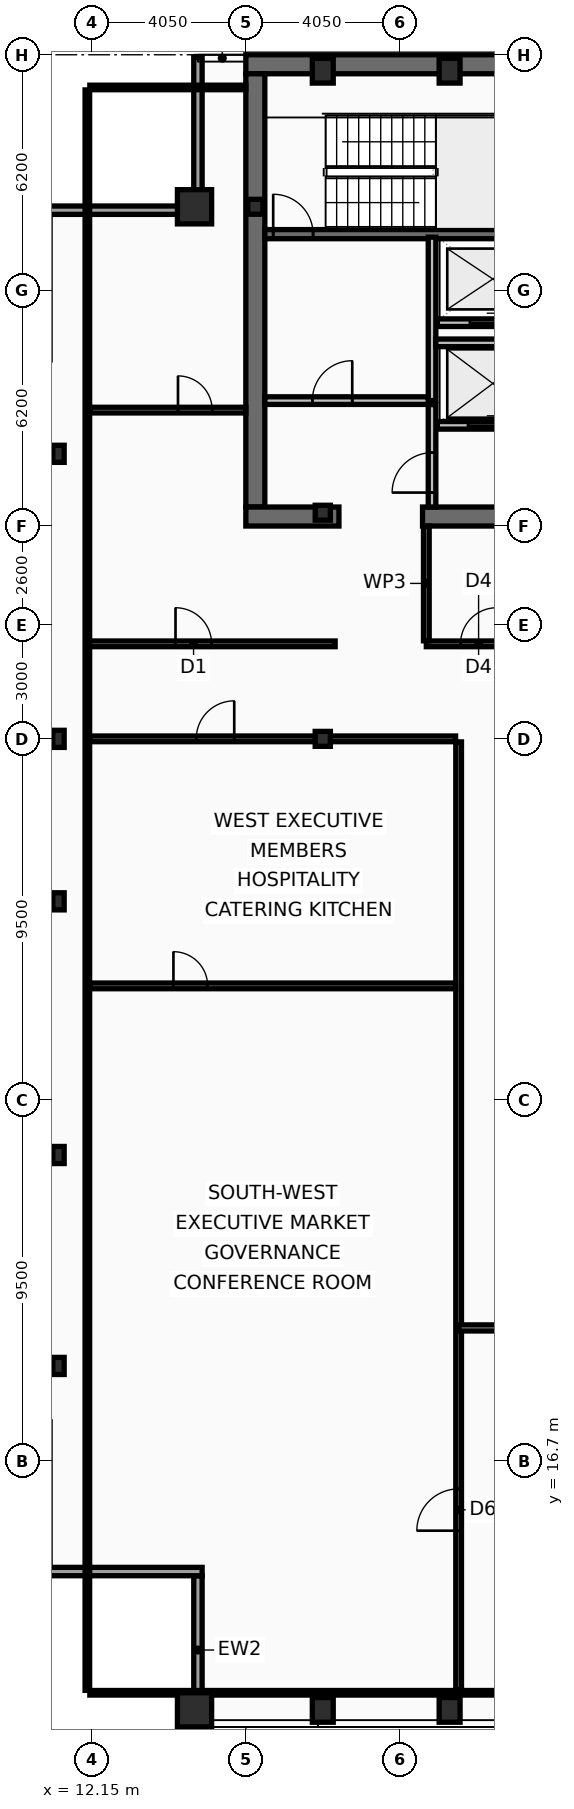
"""IFC4 building model, lengths in metres.
Left out: names, types, materials, properties, quantities, classifications, styles, units other than length and angle.
Written with IfcOpenShell. Run it as: python <this file> out.ifc"""

import sys

from ifc_helpers import new_model, si_unit, direction, frame, frame_2d, origin, origin_2d, place, context, subcontext, project, spatial, rectangle, hollow_rectangle, i_section, extrude, element, fill, save


model = new_model("IFC4")
c1 = context("Model", 3, precision=1e-05, world=origin(), true_north=direction((0.0, 1.0)))
c2 = subcontext(c1, "Body", "Model", "MODEL_VIEW")
j1 = project(units=[si_unit("LENGTHUNIT", "METRE"), si_unit("PLANEANGLEUNIT", "RADIAN")], contexts=[c1])
p1 = place(None, origin())
s1 = spatial("IfcSite", under=j1, at=p1, CompositionType="ELEMENT")
p2 = place(p1, origin())
s2 = spatial("IfcBuilding", under=s1, at=p2, CompositionType="ELEMENT")
p3 = place(p2, frame((0.0, 0.0, 329.0)))
s3 = spatial("IfcBuildingStorey", under=s2, at=p3, CompositionType="ELEMENT", Elevation=329.0)
p4 = place(p3, frame((16.2, 53.45, 0.0), z_axis=(0.0, 0.0, 1.0), x_axis=(1.0, 0.0, 0.0)))
e1 = element("IfcWall", 1, at=p4, inside=s3, PredefinedType="SHEAR", context=c2, shape_type="SweptSolid", body=[
    extrude(rectangle(XDim=40.5, YDim=0.5, at=frame_2d((20.25, 0.0))), origin(), (0.0, 0.0, 1.0), 3.44),
])
p5 = place(p3, frame((16.45, 41.8, 0.0), z_axis=(0.0, 0.0, 1.0), x_axis=(0.0, 1.0, 0.0)))
e2 = element("IfcWall", 2, at=p5, inside=s3, PredefinedType="SHEAR", context=c2, shape_type="SweptSolid", body=[
    extrude(rectangle(XDim=11.4, YDim=0.5, at=frame_2d((5.7, 0.0))), origin(), (0.0, 0.0, 1.0), 3.44),
])
p6 = place(p3, frame((18.65, 41.55, 0.0), z_axis=(0.0, 0.0, 1.0), x_axis=(-1.0, 0.0, 0.0)))
e3 = element("IfcWall", 3, at=p6, inside=s3, PredefinedType="SHEAR", context=c2, shape_type="SweptSolid", body=[
    extrude(rectangle(XDim=2.45, YDim=0.5, at=frame_2d((1.225, 0.0))), origin(), (0.0, 0.0, 1.0), 3.44),
])
p7 = place(p3, frame((32.3, 41.55, 0.0), z_axis=(0.0, 0.0, 1.0), x_axis=(-1.0, 0.0, 0.0)))
e4 = element("IfcWall", 4, at=p7, inside=s3, PredefinedType="SHEAR", context=c2, shape_type="SweptSolid", body=[
    extrude(rectangle(XDim=11.45, YDim=0.5, at=frame_2d((5.725, 0.0))), origin(), (0.0, 0.0, 1.0), 3.44),
])
p8 = place(p3, frame((16.7, 48.98, 0.0), z_axis=(0.0, 0.0, 1.0), x_axis=(1.0, 0.0, 0.0)))
e5 = element("IfcWall", 5, at=p8, inside=s3, PredefinedType="SHEAR", context=c2, shape_type="SweptSolid", body=[
    extrude(rectangle(XDim=7.52, YDim=0.24, at=frame_2d((3.76, 0.0))), origin(), (0.0, 0.0, 1.0), 3.44),
])
p9 = place(p8, frame((0.22, 0.0, 0.0)))
e6 = element("IfcOpeningElement", 6, at=p9, cuts=e5, PredefinedType="OPENING", context=c2, shape_type="SweptSolid", body=[
    extrude(rectangle(XDim=1.05, YDim=2.15, at=frame_2d((0.525, 1.075))), frame((0.0, 0.13, 0.0), z_axis=(0.0, -1.0, 0.0), x_axis=(1.0, 0.0, 0.0)), (0.0, 0.0, 1.0), 0.26),
])
for number, where, z_axis, x_axis in (
    (7, (14.85, 10.15, 0.0), (0.0, 0.0, 1.0), (1.0, 0.0, 0.0)),
    (8, (14.85, 49.7, 0.0), (0.0, 0.0, 1.0), (1.0, 0.0, 0.0)),
):
    element("IfcColumn", number, at=place(p3, frame(where, z_axis=z_axis, x_axis=x_axis)), inside=s3, PredefinedType="COLUMN", context=c2, shape_type="SweptSolid", body=[
        extrude(hollow_rectangle(XDim=0.9, YDim=0.9, WallThickness=0.05, at=origin_2d()), origin(), (0.0, 0.0, 1.0), 3.6),
    ])
for number, where, z_axis, x_axis in (
    (9, (18.225, 10.15, 0.0), (0.0, 0.0, 1.0), (1.0, 0.0, 0.0)),
    (10, (21.562, 10.15, 0.0), (0.0, 0.0, 1.0), (1.0, 0.0, 0.0)),
    (11, (18.225, 53.28, 0.0), (0.0, 0.0, 1.0), (1.0, 0.0, 0.0)),
    (12, (21.562, 53.28, 0.0), (0.0, 0.0, 1.0), (1.0, 0.0, 0.0)),
):
    element("IfcColumn", number, at=place(p3, frame(where, z_axis=z_axis, x_axis=x_axis)), inside=s3, PredefinedType="COLUMN", context=c2, shape_type="SweptSolid", body=[
        extrude(hollow_rectangle(XDim=0.55, YDim=0.65, WallThickness=0.04, at=origin_2d()), origin(), (0.0, 0.0, 1.0), 3.6),
    ])
for number, where, z_axis, x_axis in (
    (13, (11.27, 19.2, 0.0), (0.0, 0.0, 1.0), (1.0, 0.0, 0.0)),
    (14, (11.27, 24.75, 0.0), (0.0, 0.0, 1.0), (1.0, 0.0, 0.0)),
    (15, (11.27, 31.425, 0.0), (0.0, 0.0, 1.0), (1.0, 0.0, 0.0)),
    (16, (11.27, 35.7, 0.0), (0.0, 0.0, 1.0), (1.0, 0.0, 0.0)),
    (17, (11.27, 43.2, 0.0), (0.0, 0.0, 1.0), (1.0, 0.0, 0.0)),
):
    element("IfcColumn", number, at=place(p3, frame(where, z_axis=z_axis, x_axis=x_axis)), inside=s3, PredefinedType="COLUMN", context=c2, shape_type="SweptSolid", body=[
        extrude(i_section(OverallWidth=0.3, OverallDepth=0.45, WebThickness=0.014, FlangeThickness=0.026, at=origin_2d()), origin(), (0.0, 0.0, 1.0), 3.6),
    ])
for number, where, z_axis, x_axis in (
    (18, (16.45, 49.7, 0.0), (0.0, 0.0, 1.0), (1.0, 0.0, 0.0)),
    (19, (18.225, 35.7, 0.0), (0.0, 0.0, 1.0), (1.0, 0.0, 0.0)),
    (20, (18.225, 41.65, 0.0), (0.0, 0.0, 1.0), (1.0, 0.0, 0.0)),
):
    element("IfcColumn", number, at=place(p3, frame(where, z_axis=z_axis, x_axis=x_axis)), inside=s3, PredefinedType="COLUMN", context=c2, shape_type="SweptSolid", body=[
        extrude(i_section(OverallWidth=0.399, OverallDepth=0.393, WebThickness=0.023, FlangeThickness=0.037, at=origin_2d()), origin(), (0.0, 0.0, 1.0), 3.6),
    ])
p10 = place(p3, frame((14.94, 9.77, 0.0), z_axis=(0.0, 0.0, 1.0), x_axis=(0.0, 1.0, 0.0)))
e21 = element("IfcWall", 21, at=p10, inside=s3, PredefinedType="SOLIDWALL", context=c2, shape_type="SweptSolid", body=[
    extrude(rectangle(XDim=3.91, YDim=0.22, at=frame_2d((1.955, 0.0))), origin(), (0.0, 0.0, 1.0), 2.88),
])
for number, where, z_axis, x_axis in (
    (22, (15.05, 13.79, 0.0), (0.0, 0.0, 1.0), (-1.0, 0.0, 0.0)),
    (23, (10.83, 49.61, 0.0), (0.0, 0.0, 1.0), (1.0, 0.0, 0.0)),
):
    element("IfcWall", number, at=place(p3, frame(where, z_axis=z_axis, x_axis=x_axis)), inside=s3, PredefinedType="SOLIDWALL", context=c2, shape_type="SweptSolid", body=[
        extrude(rectangle(XDim=4.22, YDim=0.22, at=frame_2d((2.11, 0.0))), origin(), (0.0, 0.0, 1.0), 2.88),
    ])
p11 = place(p3, frame((14.94, 49.72, 0.0), z_axis=(0.0, 0.0, 1.0), x_axis=(0.0, 1.0, 0.0)))
e24 = element("IfcWall", 24, at=p11, inside=s3, PredefinedType="SOLIDWALL", context=c2, shape_type="SweptSolid", body=[
    extrude(rectangle(XDim=3.91, YDim=0.22, at=frame_2d((1.955, 0.0))), origin(), (0.0, 0.0, 1.0), 2.88),
])
p12 = place(p3, frame((24.21, 43.95, 0.0), z_axis=(0.0, 0.0, 1.0), x_axis=(-1.0, 0.0, 0.0)))
e25 = element("IfcWall", 25, at=p12, inside=s3, PredefinedType="PARTITIONING", context=c2, shape_type="SweptSolid", body=[
    extrude(rectangle(XDim=2.97, YDim=0.2, at=frame_2d((1.485, 0.0))), origin(), (0.0, 0.0, 1.0), 3.44),
])
p13 = place(p12, frame((0.86, 0.0, 0.0)))
e26 = element("IfcOpeningElement", 26, at=p13, cuts=e25, PredefinedType="OPENING", context=c2, shape_type="SweptSolid", body=[
    extrude(rectangle(XDim=1.3, YDim=2.18, at=frame_2d((0.65, 1.09))), frame((0.0, 0.11, 0.0), z_axis=(0.0, -1.0, 0.0), x_axis=(1.0, 0.0, 0.0)), (0.0, 0.0, 1.0), 0.22),
])
p14 = place(p3, frame((24.21, 46.65, 0.0), z_axis=(0.0, 0.0, 1.0), x_axis=(-1.0, 0.0, 0.0)))
e27 = element("IfcWall", 27, at=p14, inside=s3, PredefinedType="PARTITIONING", context=c2, shape_type="SweptSolid", body=[
    extrude(rectangle(XDim=2.97, YDim=0.2, at=frame_2d((1.485, 0.0))), origin(), (0.0, 0.0, 1.0), 3.44),
])
p15 = place(p14, frame((0.91, 0.0, 0.0)))
e28 = element("IfcOpeningElement", 28, at=p15, cuts=e27, PredefinedType="OPENING", context=c2, shape_type="SweptSolid", body=[
    extrude(rectangle(XDim=1.2, YDim=2.18, at=frame_2d((0.6, 1.09))), frame((0.0, 0.11, 0.0), z_axis=(0.0, -1.0, 0.0), x_axis=(1.0, 0.0, 0.0)), (0.0, 0.0, 1.0), 0.22),
])
p16 = place(p3, frame((21.1, 44.6, 0.0), z_axis=(0.0, 0.0, 1.0), x_axis=(0.0, 1.0, 0.0)))
e29 = element("IfcWall", 29, at=p16, inside=s3, PredefinedType="PARTITIONING", context=c2, shape_type="SweptSolid", body=[
    extrude(rectangle(XDim=4.3, YDim=0.2, at=frame_2d((2.15, 0.0))), origin(), (0.0, 0.0, 1.0), 3.44),
])
p17 = place(p3, frame((16.7, 44.6, 0.0), z_axis=(0.0, 0.0, 1.0), x_axis=(1.0, 0.0, 0.0)))
e30 = element("IfcWall", 30, at=p17, inside=s3, PredefinedType="PARTITIONING", context=c2, shape_type="SweptSolid", body=[
    extrude(rectangle(XDim=4.3, YDim=0.2, at=frame_2d((2.15, 0.0))), origin(), (0.0, 0.0, 1.0), 3.44),
])
p18 = place(p17, frame((1.25, 0.0, 0.0)))
e31 = element("IfcOpeningElement", 31, at=p18, cuts=e30, PredefinedType="OPENING", context=c2, shape_type="SweptSolid", body=[
    extrude(rectangle(XDim=1.05, YDim=2.15, at=frame_2d((0.525, 1.075))), frame((0.0, 0.11, 0.0), z_axis=(0.0, -1.0, 0.0), x_axis=(1.0, 0.0, 0.0)), (0.0, 0.0, 1.0), 0.22),
])
p19 = place(p3, frame((21.2, 46.12, 0.0), z_axis=(0.0, 0.0, 1.0), x_axis=(1.0, 0.0, 0.0)))
e32 = element("IfcWall", 32, at=p19, inside=s3, PredefinedType="PARTITIONING", context=c2, shape_type="SweptSolid", body=[
    extrude(rectangle(XDim=3.02, YDim=0.2, at=frame_2d((1.51, 0.0))), origin(), (0.0, 0.0, 1.0), 3.44),
])
p20 = place(p3, frame((21.1, 41.8, 0.0), z_axis=(0.0, 0.0, 1.0), x_axis=(0.0, 1.0, 0.0)))
e33 = element("IfcWall", 33, at=p20, inside=s3, PredefinedType="PARTITIONING", context=c2, shape_type="SweptSolid", body=[
    extrude(rectangle(XDim=2.695, YDim=0.2, at=frame_2d((1.348, 0.0))), origin(), (0.0, 0.0, 1.0), 3.44),
])
p21 = place(p20, frame((0.38, 0.0, 0.0)))
e34 = element("IfcOpeningElement", 34, at=p21, cuts=e33, PredefinedType="OPENING", context=c2, shape_type="SweptSolid", body=[
    extrude(rectangle(XDim=1.05, YDim=2.15, at=frame_2d((0.525, 1.075))), frame((0.0, 0.11, 0.0), z_axis=(0.0, -1.0, 0.0), x_axis=(1.0, 0.0, 0.0)), (0.0, 0.0, 1.0), 0.22),
])
p22 = place(p3, frame((20.95, 38.2, 0.0), z_axis=(0.0, 0.0, 1.0), x_axis=(1.0, 0.0, 0.0)))
e35 = element("IfcWall", 35, at=p22, inside=s3, PredefinedType="PARTITIONING", context=c2, shape_type="SweptSolid", body=[
    extrude(rectangle(XDim=4.55, YDim=0.15, at=frame_2d((2.275, 0.0))), origin(), (0.0, 0.0, 1.0), 2.83),
])
p23 = place(p22, frame((0.9, 0.0, 0.0)))
e36 = element("IfcOpeningElement", 36, at=p23, cuts=e35, PredefinedType="OPENING", context=c2, shape_type="SweptSolid", body=[
    extrude(rectangle(XDim=0.95, YDim=2.05, at=frame_2d((0.475, 1.025))), frame((0.0, 0.085, 0.0), z_axis=(0.0, -1.0, 0.0), x_axis=(1.0, 0.0, 0.0)), (0.0, 0.0, 1.0), 0.17),
])
p24 = place(p3, frame((20.95, 38.28, 0.0), z_axis=(0.0, 0.0, 1.0), x_axis=(0.0, 1.0, 0.0)))
e37 = element("IfcWall", 37, at=p24, inside=s3, PredefinedType="PARTITIONING", context=c2, shape_type="SweptSolid", body=[
    extrude(rectangle(XDim=3.02, YDim=0.15, at=frame_2d((1.51, 0.0))), origin(), (0.0, 0.0, 1.0), 3.44),
])
p25 = place(p3, frame((12.03, 38.2, 0.0), z_axis=(0.0, 0.0, 1.0), x_axis=(1.0, 0.0, 0.0)))
e38 = element("IfcWall", 38, at=p25, inside=s3, PredefinedType="PARTITIONING", context=c2, shape_type="SweptSolid", body=[
    extrude(rectangle(XDim=6.52, YDim=0.15, at=frame_2d((3.26, 0.0))), origin(), (0.0, 0.0, 1.0), 2.83),
])
p26 = place(p25, frame((2.32, 0.0, 0.0)))
e39 = element("IfcOpeningElement", 39, at=p26, cuts=e38, PredefinedType="OPENING", context=c2, shape_type="SweptSolid", body=[
    extrude(rectangle(XDim=0.95, YDim=2.05, at=frame_2d((0.475, 1.025))), frame((0.0, 0.085, 0.0), z_axis=(0.0, -1.0, 0.0), x_axis=(1.0, 0.0, 0.0)), (0.0, 0.0, 1.0), 0.17),
])
p27 = place(p3, frame((12.095, 44.35, 0.0), z_axis=(0.0, 0.0, 1.0), x_axis=(1.0, 0.0, 0.0)))
e40 = element("IfcWall", 40, at=p27, inside=s3, PredefinedType="PARTITIONING", context=c2, shape_type="SweptSolid", body=[
    extrude(rectangle(XDim=4.105, YDim=0.15, at=frame_2d((2.052, 0.0))), origin(), (0.0, 0.0, 1.0), 2.88),
])
p28 = place(p27, frame((2.32, 0.0, 0.0)))
e41 = element("IfcOpeningElement", 41, at=p28, cuts=e40, PredefinedType="OPENING", context=c2, shape_type="SweptSolid", body=[
    extrude(rectangle(XDim=0.9, YDim=2.05, at=frame_2d((0.45, 1.025))), frame((0.0, 0.085, 0.0), z_axis=(0.0, -1.0, 0.0), x_axis=(1.0, 0.0, 0.0)), (0.0, 0.0, 1.0), 0.17),
])
p29 = place(p3, frame((21.8, 10.665, 0.0), z_axis=(0.0, 0.0, 1.0), x_axis=(0.0, 1.0, 0.0)))
e42 = element("IfcWall", 42, at=p29, inside=s3, PredefinedType="PARTITIONING", context=c2, shape_type="SweptSolid", body=[
    extrude(rectangle(XDim=24.955, YDim=0.15, at=frame_2d((12.478, 0.0))), origin(), (0.0, 0.0, 1.0), 3.07),
])
p30 = place(p29, frame((4.2, 0.0, 0.0)))
e43 = element("IfcOpeningElement", 43, at=p30, cuts=e42, PredefinedType="OPENING", context=c2, shape_type="SweptSolid", body=[
    extrude(rectangle(XDim=1.1, YDim=2.1, at=frame_2d((0.55, 1.05))), frame((0.0, 0.085, 0.0), z_axis=(0.0, -1.0, 0.0), x_axis=(1.0, 0.0, 0.0)), (0.0, 0.0, 1.0), 0.17),
])
p31 = place(p3, frame((12.095, 35.7, 0.0), z_axis=(0.0, 0.0, 1.0), x_axis=(1.0, 0.0, 0.0)))
e44 = element("IfcWall", 44, at=p31, inside=s3, PredefinedType="PARTITIONING", context=c2, shape_type="SweptSolid", body=[
    extrude(rectangle(XDim=9.625, YDim=0.15, at=frame_2d((4.812, 0.0))), origin(), (0.0, 0.0, 1.0), 2.83),
])
p32 = place(p31, frame((2.8, 0.0, 0.0)))
e45 = element("IfcOpeningElement", 45, at=p32, cuts=e44, PredefinedType="OPENING", context=c2, shape_type="SweptSolid", body=[
    extrude(rectangle(XDim=1.0, YDim=2.05, at=frame_2d((0.5, 1.025))), frame((0.0, 0.085, 0.0), z_axis=(0.0, -1.0, 0.0), x_axis=(1.0, 0.0, 0.0)), (0.0, 0.0, 1.0), 0.17),
])
p33 = place(p3, frame((12.095, 29.2, 0.0), z_axis=(0.0, 0.0, 1.0), x_axis=(1.0, 0.0, 0.0)))
e46 = element("IfcWall", 46, at=p33, inside=s3, PredefinedType="PARTITIONING", context=c2, shape_type="SweptSolid", body=[
    extrude(rectangle(XDim=9.625, YDim=0.15, at=frame_2d((4.812, 0.0))), origin(), (0.0, 0.0, 1.0), 2.83),
])
p34 = place(p33, frame((2.2, 0.0, 0.0)))
e47 = element("IfcOpeningElement", 47, at=p34, cuts=e46, PredefinedType="OPENING", context=c2, shape_type="SweptSolid", body=[
    extrude(rectangle(XDim=0.9, YDim=2.05, at=frame_2d((0.45, 1.025))), frame((0.0, 0.085, 0.0), z_axis=(0.0, -1.0, 0.0), x_axis=(1.0, 0.0, 0.0)), (0.0, 0.0, 1.0), 0.17),
])
p35 = place(p3, frame((21.8, 20.2, 0.0), z_axis=(0.0, 0.0, 1.0), x_axis=(1.0, 0.0, 0.0)))
e48 = element("IfcWall", 48, at=p35, inside=s3, PredefinedType="PARTITIONING", context=c2, shape_type="SweptSolid", body=[
    extrude(rectangle(XDim=8.599, YDim=0.16, at=frame_2d((4.299, 0.0))), origin(), (0.0, 0.0, 1.0), 2.83),
])
p36 = place(p35, frame((3.611, 0.0, 0.0)))
e49 = element("IfcOpeningElement", 49, at=p36, cuts=e48, PredefinedType="OPENING", context=c2, shape_type="SweptSolid", body=[
    extrude(rectangle(XDim=1.0, YDim=2.05, at=frame_2d((0.5, 1.025))), frame((0.0, 0.09, 0.0), z_axis=(0.0, -1.0, 0.0), x_axis=(1.0, 0.0, 0.0)), (0.0, 0.0, 1.0), 0.18),
])
p37 = place(p3, frame((12.03, 10.665, 0.0), z_axis=(0.0, 0.0, 1.0), x_axis=(0.0, 1.0, 0.0)))
e50 = element("IfcWall", 50, at=p37, inside=s3, PredefinedType="PARTITIONING", context=c2, shape_type="SweptSolid", body=[
    extrude(rectangle(XDim=42.11, YDim=0.12, at=frame_2d((21.055, 0.0))), origin(), (0.0, 0.0, 1.0), 2.83),
])
p38 = place(p3, frame((12.095, 52.84, 0.0), z_axis=(0.0, 0.0, 1.0), x_axis=(1.0, 0.0, 0.0)))
e51 = element("IfcWall", 51, at=p38, inside=s3, PredefinedType="PARTITIONING", context=c2, shape_type="SweptSolid", body=[
    extrude(rectangle(XDim=4.105, YDim=0.12, at=frame_2d((2.052, 0.0))), origin(), (0.0, 0.0, 1.0), 3.44),
])
p39 = place(p3, frame((12.095, 10.6, 0.0), z_axis=(0.0, 0.0, 1.0), x_axis=(1.0, 0.0, 0.0)))
e52 = element("IfcWall", 52, at=p39, inside=s3, PredefinedType="PARTITIONING", context=c2, shape_type="SweptSolid", body=[
    extrude(rectangle(XDim=48.71, YDim=0.12, at=frame_2d((24.355, 0.0))), origin(), (0.0, 0.0, 1.0), 2.83),
])
p40 = place(p9, origin())
e53 = element("IfcDoor", 53, at=p40, inside=s3, OperationType="SINGLE_SWING_LEFT", PredefinedType="DOOR", context=c2, shape_type="SweptSolid", body=[
    extrude(rectangle(XDim=1.05, YDim=2.15, at=frame_2d((0.525, 1.075))), frame((0.0, 0.025, 0.0), z_axis=(0.0, -1.0, 0.0), x_axis=(1.0, 0.0, 0.0)), (0.0, 0.0, 1.0), 0.05),
])
fill(e6, e53)
p41 = place(p13, origin())
e54 = element("IfcDoor", 54, at=p41, inside=s3, OperationType="SLIDING_TO_LEFT", PredefinedType="DOOR", context=c2, shape_type="SweptSolid", body=[
    extrude(rectangle(XDim=1.3, YDim=2.18, at=frame_2d((0.65, 1.09))), frame((0.0, 0.025, 0.0), z_axis=(0.0, -1.0, 0.0), x_axis=(1.0, 0.0, 0.0)), (0.0, 0.0, 1.0), 0.05),
])
fill(e26, e54)
p42 = place(p15, origin())
e55 = element("IfcDoor", 55, at=p42, inside=s3, OperationType="SLIDING_TO_LEFT", PredefinedType="DOOR", context=c2, shape_type="SweptSolid", body=[
    extrude(rectangle(XDim=1.2, YDim=2.18, at=frame_2d((0.6, 1.09))), frame((0.0, 0.025, 0.0), z_axis=(0.0, -1.0, 0.0), x_axis=(1.0, 0.0, 0.0)), (0.0, 0.0, 1.0), 0.05),
])
fill(e28, e55)
p43 = place(p18, origin())
e56 = element("IfcDoor", 56, at=p43, inside=s3, OperationType="SINGLE_SWING_RIGHT", PredefinedType="DOOR", context=c2, shape_type="SweptSolid", body=[
    extrude(rectangle(XDim=1.05, YDim=2.15, at=frame_2d((0.525, 1.075))), frame((0.0, 0.025, 0.0), z_axis=(0.0, -1.0, 0.0), x_axis=(1.0, 0.0, 0.0)), (0.0, 0.0, 1.0), 0.05),
])
fill(e31, e56)
p44 = place(p21, origin())
e57 = element("IfcDoor", 57, at=p44, inside=s3, OperationType="SINGLE_SWING_LEFT", PredefinedType="DOOR", context=c2, shape_type="SweptSolid", body=[
    extrude(rectangle(XDim=1.05, YDim=2.15, at=frame_2d((0.525, 1.075))), frame((0.0, 0.025, 0.0), z_axis=(0.0, -1.0, 0.0), x_axis=(1.0, 0.0, 0.0)), (0.0, 0.0, 1.0), 0.05),
])
fill(e34, e57)
p45 = place(p23, origin())
e58 = element("IfcDoor", 58, at=p45, inside=s3, OperationType="SINGLE_SWING_RIGHT", PredefinedType="DOOR", context=c2, shape_type="SweptSolid", body=[
    extrude(rectangle(XDim=0.95, YDim=2.05, at=frame_2d((0.475, 1.025))), frame((0.0, 0.025, 0.0), z_axis=(0.0, -1.0, 0.0), x_axis=(1.0, 0.0, 0.0)), (0.0, 0.0, 1.0), 0.05),
])
fill(e36, e58)
p46 = place(p26, origin())
e59 = element("IfcDoor", 59, at=p46, inside=s3, OperationType="SINGLE_SWING_LEFT", PredefinedType="DOOR", context=c2, shape_type="SweptSolid", body=[
    extrude(rectangle(XDim=0.95, YDim=2.05, at=frame_2d((0.475, 1.025))), frame((0.0, 0.025, 0.0), z_axis=(0.0, -1.0, 0.0), x_axis=(1.0, 0.0, 0.0)), (0.0, 0.0, 1.0), 0.05),
])
fill(e39, e59)
p47 = place(p28, origin())
e60 = element("IfcDoor", 60, at=p47, inside=s3, OperationType="SINGLE_SWING_LEFT", PredefinedType="DOOR", context=c2, shape_type="SweptSolid", body=[
    extrude(rectangle(XDim=0.9, YDim=2.05, at=frame_2d((0.45, 1.025))), frame((0.0, 0.025, 0.0), z_axis=(0.0, -1.0, 0.0), x_axis=(1.0, 0.0, 0.0)), (0.0, 0.0, 1.0), 0.05),
])
fill(e41, e60)
p48 = place(p30, origin())
e61 = element("IfcDoor", 61, at=p48, inside=s3, OperationType="SINGLE_SWING_LEFT", PredefinedType="DOOR", context=c2, shape_type="SweptSolid", body=[
    extrude(rectangle(XDim=1.1, YDim=2.1, at=frame_2d((0.55, 1.05))), frame((0.0, 0.025, 0.0), z_axis=(0.0, -1.0, 0.0), x_axis=(1.0, 0.0, 0.0)), (0.0, 0.0, 1.0), 0.05),
])
fill(e43, e61)
p49 = place(p32, origin())
e62 = element("IfcDoor", 62, at=p49, inside=s3, OperationType="SINGLE_SWING_RIGHT", PredefinedType="DOOR", context=c2, shape_type="SweptSolid", body=[
    extrude(rectangle(XDim=1.0, YDim=2.05, at=frame_2d((0.5, 1.025))), frame((0.0, 0.025, 0.0), z_axis=(0.0, -1.0, 0.0), x_axis=(1.0, 0.0, 0.0)), (0.0, 0.0, 1.0), 0.05),
])
fill(e45, e62)
p50 = place(p34, origin())
e63 = element("IfcDoor", 63, at=p50, inside=s3, OperationType="SINGLE_SWING_LEFT", PredefinedType="DOOR", context=c2, shape_type="SweptSolid", body=[
    extrude(rectangle(XDim=0.9, YDim=2.05, at=frame_2d((0.45, 1.025))), frame((0.0, 0.025, 0.0), z_axis=(0.0, -1.0, 0.0), x_axis=(1.0, 0.0, 0.0)), (0.0, 0.0, 1.0), 0.05),
])
fill(e47, e63)
save(model, sys.argv[1])
